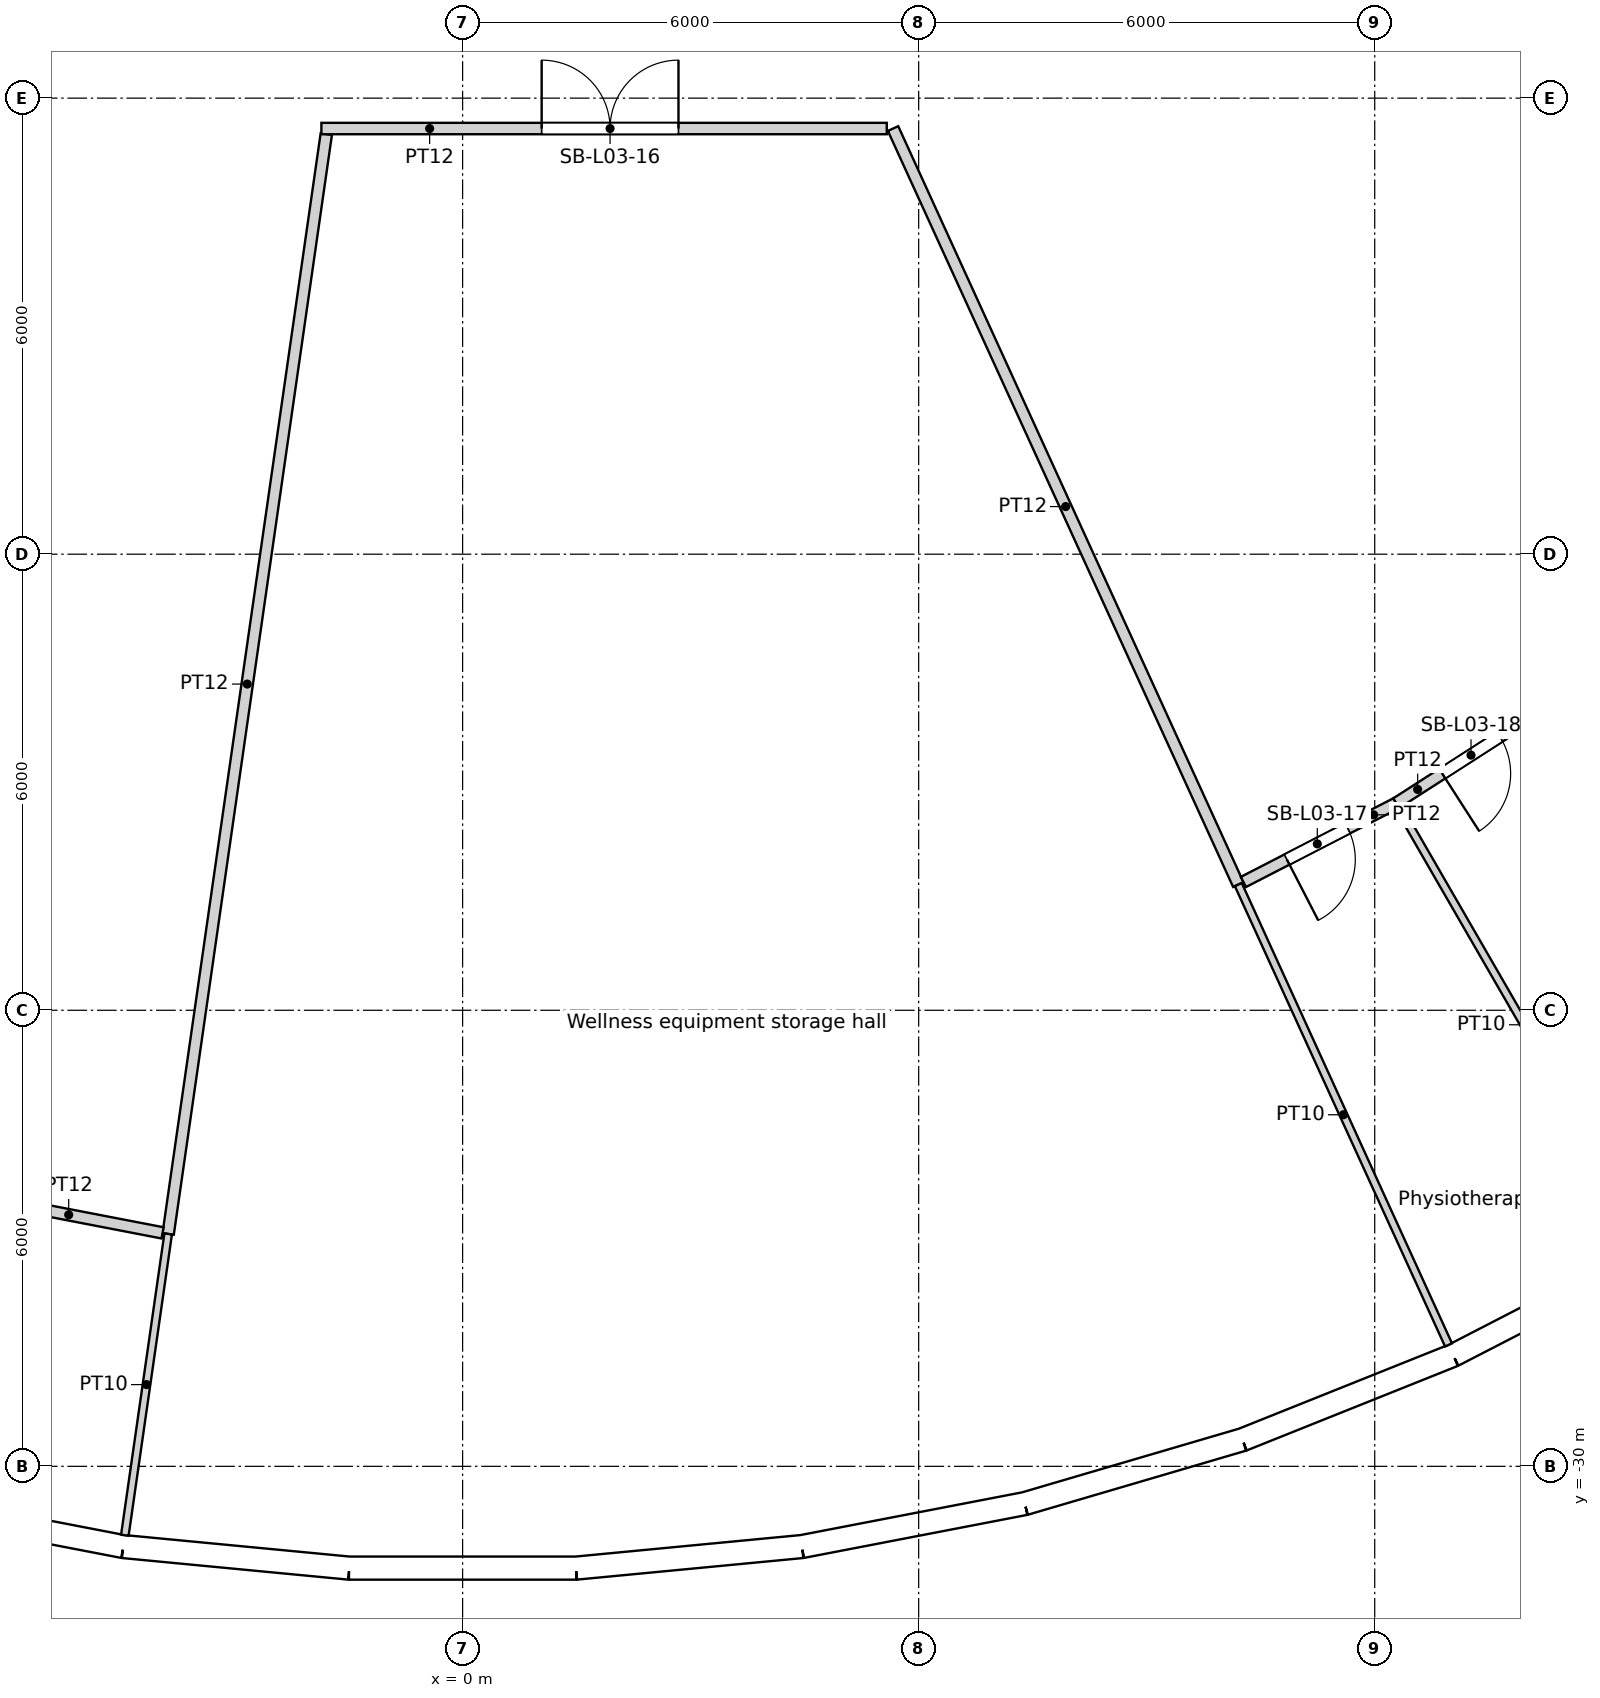
"""IFC4 building model, lengths in metres.
Left out: names, types, materials, properties, quantities, classifications, styles, units other than length and angle.
Written with IfcOpenShell. Run it as: python <this file> out.ifc"""

import sys

from ifc_helpers import new_model, si_unit, direction, frame, frame_2d, origin, origin_2d, place, context, subcontext, project, spatial, rectangle, circle, extrude, element, fill, save


model = new_model("IFC4")
c1 = context("Model", 3, precision=1e-05, world=origin(), true_north=direction((0.0, 1.0)))
c2 = subcontext(c1, "Body", "Model", "MODEL_VIEW")
j1 = project(units=[si_unit("LENGTHUNIT", "METRE"), si_unit("PLANEANGLEUNIT", "RADIAN")], contexts=[c1])
p1 = place(None, origin())
s1 = spatial("IfcSite", under=j1, at=p1, CompositionType="ELEMENT")
p2 = place(p1, origin())
s2 = spatial("IfcBuilding", under=s1, at=p2, CompositionType="ELEMENT")
p3 = place(p2, frame((0.0, 0.0, 18.6)))
s3 = spatial("IfcBuildingStorey", under=s2, at=p3, CompositionType="ELEMENT", Elevation=18.6)
for number, where, z_axis, x_axis in (
    (1, (-4.309, -29.966, 0.0), (0.0, 0.0, 1.0), (1.0, 0.0, 0.0)),
    (2, (1.44, -30.24, 0.0), (0.0, 0.0, 1.0), (1.0, 0.0, 0.0)),
    (3, (7.137, -29.421, 0.0), (0.0, 0.0, 1.0), (1.0, 0.0, 0.0)),
    (4, (12.576, -27.539, 0.0), (0.0, 0.0, 1.0), (1.0, 0.0, 0.0)),
):
    element("IfcColumn", number, at=place(p3, frame(where, z_axis=z_axis, x_axis=x_axis)), inside=s3, PredefinedType="COLUMN", context=c2, shape_type="SweptSolid", body=[
        extrude(circle(Radius=0.7, at=origin_2d()), origin(), (0.0, 0.0, 1.0), 4.8),
    ])
for number, where, z_axis, x_axis in (
    (5, (-1.427, -24.506, 0.0), (0.0, 0.0, 1.0), (1.0, 0.0, 0.0)),
    (6, (4.263, -24.175, 0.0), (0.0, 0.0, 1.0), (1.0, 0.0, 0.0)),
    (7, (9.723, -22.54, 0.0), (0.0, 0.0, 1.0), (1.0, 0.0, 0.0)),
    (8, (14.659, -19.69, 0.0), (0.0, 0.0, 1.0), (1.0, 0.0, 0.0)),
):
    element("IfcColumn", number, at=place(p3, frame(where, z_axis=z_axis, x_axis=x_axis)), inside=s3, PredefinedType="COLUMN", context=c2, shape_type="SweptSolid", body=[
        extrude(circle(Radius=0.75, at=origin_2d()), origin(), (0.0, 0.0, 1.0), 4.8),
    ])
for number, where, z_axis, x_axis in (
    (9, (-4.188, -18.35, 0.0), (0.0, 0.0, 1.0), (1.0, 0.0, 0.0)),
    (10, (1.406, -18.77, 0.0), (0.0, 0.0, 1.0), (1.0, 0.0, 0.0)),
    (11, (6.876, -17.521, 0.0), (0.0, 0.0, 1.0), (1.0, 0.0, 0.0)),
    (12, (11.735, -14.716, 0.0), (0.0, 0.0, 1.0), (1.0, 0.0, 0.0)),
):
    element("IfcColumn", number, at=place(p3, frame(where, z_axis=z_axis, x_axis=x_axis)), inside=s3, PredefinedType="COLUMN", context=c2, shape_type="SweptSolid", body=[
        extrude(circle(Radius=0.8, at=origin_2d()), origin(), (0.0, 0.0, 1.0), 4.8),
    ])
p4 = place(p3, frame((-7.397, -30.49, 0.0), z_axis=(0.0, 0.0, 1.0), x_axis=(0.981918853666, -0.189302310646, 0.0)))
e13 = element("IfcWall", 13, at=p4, inside=s3, PredefinedType="SOLIDWALL", context=c2, shape_type="SweptSolid", body=[
    extrude(rectangle(XDim=2.986, YDim=0.3, at=frame_2d((1.493, 0.0))), origin(), (0.0, 0.0, 1.0), 4.35),
])
p5 = place(p4, frame((1.493, 0.0, 2.0)))
e14 = element("IfcOpeningElement", 14, at=p5, cuts=e13, PredefinedType="OPENING", context=c2, shape_type="SweptSolid", body=[
    extrude(circle(Radius=1.2, at=origin_2d()), frame((0.0, 0.16, 0.0), z_axis=(0.0, -1.0, 0.0), x_axis=(1.0, 0.0, 0.0)), (0.0, 0.0, 1.0), 0.32),
])
p6 = place(p3, frame((-4.465, -31.055, 0.0), z_axis=(0.0, 0.0, 1.0), x_axis=(0.99547560533, -0.095017467833, 0.0)))
e15 = element("IfcWall", 15, at=p6, inside=s3, PredefinedType="SOLIDWALL", context=c2, shape_type="SweptSolid", body=[
    extrude(rectangle(XDim=2.986, YDim=0.3, at=frame_2d((1.493, 0.0))), origin(), (0.0, 0.0, 1.0), 4.35),
])
p7 = place(p6, frame((1.493, 0.0, 2.0)))
e16 = element("IfcOpeningElement", 16, at=p7, cuts=e15, PredefinedType="OPENING", context=c2, shape_type="SweptSolid", body=[
    extrude(circle(Radius=1.2, at=origin_2d()), frame((0.0, 0.16, 0.0), z_axis=(0.0, -1.0, 0.0), x_axis=(1.0, 0.0, 0.0)), (0.0, 0.0, 1.0), 0.32),
])
p8 = place(p3, frame((-1.493, -31.339, 0.0), z_axis=(0.0, 0.0, 1.0), x_axis=(1.0, 0.0, 0.0)))
e17 = element("IfcWall", 17, at=p8, inside=s3, PredefinedType="SOLIDWALL", context=c2, shape_type="SweptSolid", body=[
    extrude(rectangle(XDim=2.986, YDim=0.3, at=frame_2d((1.493, 0.0))), origin(), (0.0, 0.0, 1.0), 4.35),
])
p9 = place(p8, frame((1.493, 0.0, 2.0)))
e18 = element("IfcOpeningElement", 18, at=p9, cuts=e17, PredefinedType="OPENING", context=c2, shape_type="SweptSolid", body=[
    extrude(circle(Radius=1.2, at=origin_2d()), frame((0.0, 0.16, 0.0), z_axis=(0.0, -1.0, 0.0), x_axis=(1.0, 0.0, 0.0)), (0.0, 0.0, 1.0), 0.32),
])
p10 = place(p3, frame((1.493, -31.339, 0.0), z_axis=(0.0, 0.0, 1.0), x_axis=(0.99547560533, 0.095017467833, 0.0)))
e19 = element("IfcWall", 19, at=p10, inside=s3, PredefinedType="SOLIDWALL", context=c2, shape_type="SweptSolid", body=[
    extrude(rectangle(XDim=2.986, YDim=0.3, at=frame_2d((1.493, 0.0))), origin(), (0.0, 0.0, 1.0), 4.35),
])
p11 = place(p10, frame((1.493, 0.0, 2.0)))
e20 = element("IfcOpeningElement", 20, at=p11, cuts=e19, PredefinedType="OPENING", context=c2, shape_type="SweptSolid", body=[
    extrude(circle(Radius=1.2, at=origin_2d()), frame((0.0, 0.16, 0.0), z_axis=(0.0, -1.0, 0.0), x_axis=(1.0, 0.0, 0.0)), (0.0, 0.0, 1.0), 0.32),
])
p12 = place(p3, frame((4.465, -31.055, 0.0), z_axis=(0.0, 0.0, 1.0), x_axis=(0.981918853666, 0.189302310646, 0.0)))
e21 = element("IfcWall", 21, at=p12, inside=s3, PredefinedType="SOLIDWALL", context=c2, shape_type="SweptSolid", body=[
    extrude(rectangle(XDim=2.986, YDim=0.3, at=frame_2d((1.493, 0.0))), origin(), (0.0, 0.0, 1.0), 4.35),
])
p13 = place(p12, frame((1.493, 0.0, 2.0)))
e22 = element("IfcOpeningElement", 22, at=p13, cuts=e21, PredefinedType="OPENING", context=c2, shape_type="SweptSolid", body=[
    extrude(circle(Radius=1.2, at=origin_2d()), frame((0.0, 0.16, 0.0), z_axis=(0.0, -1.0, 0.0), x_axis=(1.0, 0.0, 0.0)), (0.0, 0.0, 1.0), 0.32),
])
p14 = place(p3, frame((7.397, -30.49, 0.0), z_axis=(0.0, 0.0, 1.0), x_axis=(0.959502108153, 0.281701445593, 0.0)))
e23 = element("IfcWall", 23, at=p14, inside=s3, PredefinedType="SOLIDWALL", context=c2, shape_type="SweptSolid", body=[
    extrude(rectangle(XDim=2.986, YDim=0.3, at=frame_2d((1.493, 0.0))), origin(), (0.0, 0.0, 1.0), 4.35),
])
p15 = place(p14, frame((1.493, 0.0, 2.0)))
e24 = element("IfcOpeningElement", 24, at=p15, cuts=e23, PredefinedType="OPENING", context=c2, shape_type="SweptSolid", body=[
    extrude(circle(Radius=1.2, at=origin_2d()), frame((0.0, 0.16, 0.0), z_axis=(0.0, -1.0, 0.0), x_axis=(1.0, 0.0, 0.0)), (0.0, 0.0, 1.0), 0.32),
])
p16 = place(p3, frame((10.261, -29.649, 0.0), z_axis=(0.0, 0.0, 1.0), x_axis=(0.928380795373, 0.371630325434, 0.0)))
e25 = element("IfcWall", 25, at=p16, inside=s3, PredefinedType="SOLIDWALL", context=c2, shape_type="SweptSolid", body=[
    extrude(rectangle(XDim=2.986, YDim=0.3, at=frame_2d((1.493, 0.0))), origin(), (0.0, 0.0, 1.0), 4.35),
])
p17 = place(p16, frame((1.493, 0.0, 2.0)))
e26 = element("IfcOpeningElement", 26, at=p17, cuts=e25, PredefinedType="OPENING", context=c2, shape_type="SweptSolid", body=[
    extrude(circle(Radius=1.2, at=origin_2d()), frame((0.0, 0.16, 0.0), z_axis=(0.0, -1.0, 0.0), x_axis=(1.0, 0.0, 0.0)), (0.0, 0.0, 1.0), 0.32),
])
p18 = place(p3, frame((13.033, -28.539, 0.0), z_axis=(0.0, 0.0, 1.0), x_axis=(0.888831268481, 0.458234630043, 0.0)))
e27 = element("IfcWall", 27, at=p18, inside=s3, PredefinedType="SOLIDWALL", context=c2, shape_type="SweptSolid", body=[
    extrude(rectangle(XDim=2.986, YDim=0.3, at=frame_2d((1.493, 0.0))), origin(), (0.0, 0.0, 1.0), 4.35),
])
p19 = place(p18, frame((1.493, 0.0, 2.0)))
e28 = element("IfcOpeningElement", 28, at=p19, cuts=e27, PredefinedType="OPENING", context=c2, shape_type="SweptSolid", body=[
    extrude(circle(Radius=1.2, at=origin_2d()), frame((0.0, 0.16, 0.0), z_axis=(0.0, -1.0, 0.0), x_axis=(1.0, 0.0, 0.0)), (0.0, 0.0, 1.0), 0.32),
])
p20 = place(p3, frame((-6.417, -26.452, 0.0), z_axis=(0.0, 0.0, 1.0), x_axis=(0.981923270902, -0.189279396823, 0.0)))
e29 = element("IfcWall", 29, at=p20, inside=s3, PredefinedType="PARTITIONING", context=c2, shape_type="SweptSolid", body=[
    extrude(rectangle(XDim=2.515, YDim=0.15, at=frame_2d((1.258, 0.0))), origin(), (0.0, 0.0, 1.0), 3.75),
])
p21 = place(p3, frame((-4.444, -30.906, 0.0), z_axis=(0.0, 0.0, 1.0), x_axis=(0.142291879115, 0.989824742638, 0.0)))
e30 = element("IfcWall", 30, at=p21, inside=s3, PredefinedType="PARTITIONING", context=c2, shape_type="SweptSolid", body=[
    extrude(rectangle(XDim=4.005, YDim=0.1, at=frame_2d((2.002, 0.0))), origin(), (0.0, 0.0, 1.0), 3.75),
])
p22 = place(p3, frame((-3.874, -26.943, 0.0), z_axis=(0.0, 0.0, 1.0), x_axis=(0.142302842894, 0.989823166482, 0.0)))
e31 = element("IfcWall", 31, at=p22, inside=s3, PredefinedType="PARTITIONING", context=c2, shape_type="SweptSolid", body=[
    extrude(rectangle(XDim=14.617, YDim=0.15, at=frame_2d((7.309, 0.0))), origin(), (0.0, 0.0, 1.0), 3.75),
])
p23 = place(p3, frame((5.58, -12.4, 0.0), z_axis=(0.0, 0.0, 1.0), x_axis=(-1.0, 0.0, 0.0)))
e32 = element("IfcWall", 32, at=p23, inside=s3, PredefinedType="PARTITIONING", context=c2, shape_type="SweptSolid", body=[
    extrude(rectangle(XDim=7.438, YDim=0.15, at=frame_2d((3.719, 0.0))), origin(), (0.0, 0.0, 1.0), 3.75),
])
p24 = place(p23, frame((2.74, 0.0, 0.0)))
e33 = element("IfcOpeningElement", 33, at=p24, cuts=e32, PredefinedType="OPENING", context=c2, shape_type="SweptSolid", body=[
    extrude(rectangle(XDim=1.8, YDim=2.4, at=frame_2d((0.9, 1.2))), frame((0.0, 0.075, 0.0), z_axis=(0.0, -1.0, 0.0), x_axis=(1.0, 0.0, 0.0)), (0.0, 0.0, 1.0), 0.15),
])
p25 = place(p3, frame((10.205, -22.347, 0.0), z_axis=(0.0, 0.0, 1.0), x_axis=(-0.415410432201, 0.909634087322, 0.0)))
e34 = element("IfcWall", 34, at=p25, inside=s3, PredefinedType="PARTITIONING", context=c2, shape_type="SweptSolid", body=[
    extrude(rectangle(XDim=10.935, YDim=0.15, at=frame_2d((5.467, 0.0))), origin(), (0.0, 0.0, 1.0), 3.75),
])
p26 = place(p3, frame((12.283, -21.275, 0.0), z_axis=(0.0, 0.0, 1.0), x_axis=(-0.888834753306, -0.458227870514, 0.0)))
e35 = element("IfcWall", 35, at=p26, inside=s3, PredefinedType="PARTITIONING", context=c2, shape_type="SweptSolid", body=[
    extrude(rectangle(XDim=2.263, YDim=0.15, at=frame_2d((1.131, 0.0))), origin(), (0.0, 0.0, 1.0), 3.75),
])
p27 = place(p26, frame((0.719, 0.0, 0.0)))
e36 = element("IfcOpeningElement", 36, at=p27, cuts=e35, PredefinedType="OPENING", context=c2, shape_type="SweptSolid", body=[
    extrude(rectangle(XDim=0.9, YDim=2.1, at=frame_2d((0.45, 1.05))), frame((0.0, 0.075, 0.0), z_axis=(0.0, -1.0, 0.0), x_axis=(1.0, 0.0, 0.0)), (0.0, 0.0, 1.0), 0.15),
])
p28 = place(p3, frame((14.25, -20.011, 0.0), z_axis=(0.0, 0.0, 1.0), x_axis=(-0.841236155743, -0.540667855777, 0.0)))
e37 = element("IfcWall", 37, at=p28, inside=s3, PredefinedType="PARTITIONING", context=c2, shape_type="SweptSolid", body=[
    extrude(rectangle(XDim=2.338, YDim=0.15, at=frame_2d((1.169, 0.0))), origin(), (0.0, 0.0, 1.0), 3.75),
])
p29 = place(p28, frame((0.719, 0.0, 0.0)))
e38 = element("IfcOpeningElement", 38, at=p29, cuts=e37, PredefinedType="OPENING", context=c2, shape_type="SweptSolid", body=[
    extrude(rectangle(XDim=0.9, YDim=2.1, at=frame_2d((0.45, 1.05))), frame((0.0, 0.075, 0.0), z_axis=(0.0, -1.0, 0.0), x_axis=(1.0, 0.0, 0.0)), (0.0, 0.0, 1.0), 0.15),
])
p30 = place(p3, frame((12.971, -28.403, 0.0), z_axis=(0.0, 0.0, 1.0), x_axis=(-0.415413073128, 0.909632881263, 0.0)))
e39 = element("IfcWall", 39, at=p30, inside=s3, PredefinedType="PARTITIONING", context=c2, shape_type="SweptSolid", body=[
    extrude(rectangle(XDim=6.657, YDim=0.1, at=frame_2d((3.329, 0.0))), origin(), (0.0, 0.0, 1.0), 3.75),
])
p31 = place(p3, frame((15.612, -27.041, 0.0), z_axis=(0.0, 0.0, 1.0), x_axis=(-0.499996417602, 0.866027472073, 0.0)))
e40 = element("IfcWall", 40, at=p31, inside=s3, PredefinedType="PARTITIONING", context=c2, shape_type="SweptSolid", body=[
    extrude(rectangle(XDim=6.583, YDim=0.1, at=frame_2d((3.291, 0.0))), origin(), (0.0, 0.0, 1.0), 3.75),
])
p32 = place(p5, origin())
e41 = element("IfcWindow", 41, at=p32, inside=s3, PartitioningType="SINGLE_PANEL", PredefinedType="WINDOW", context=c2, shape_type="SweptSolid", body=[
    extrude(circle(Radius=1.2, at=origin_2d()), frame((0.0, 0.12, 0.0), z_axis=(0.0, -1.0, 0.0), x_axis=(1.0, 0.0, 0.0)), (0.0, 0.0, 1.0), 0.1),
])
fill(e14, e41)
p33 = place(p7, origin())
e42 = element("IfcWindow", 42, at=p33, inside=s3, PartitioningType="SINGLE_PANEL", PredefinedType="WINDOW", context=c2, shape_type="SweptSolid", body=[
    extrude(circle(Radius=1.2, at=origin_2d()), frame((0.0, 0.12, 0.0), z_axis=(0.0, -1.0, 0.0), x_axis=(1.0, 0.0, 0.0)), (0.0, 0.0, 1.0), 0.1),
])
fill(e16, e42)
p34 = place(p9, origin())
e43 = element("IfcWindow", 43, at=p34, inside=s3, PartitioningType="SINGLE_PANEL", PredefinedType="WINDOW", context=c2, shape_type="SweptSolid", body=[
    extrude(circle(Radius=1.2, at=origin_2d()), frame((0.0, 0.12, 0.0), z_axis=(0.0, -1.0, 0.0), x_axis=(1.0, 0.0, 0.0)), (0.0, 0.0, 1.0), 0.1),
])
fill(e18, e43)
p35 = place(p11, origin())
e44 = element("IfcWindow", 44, at=p35, inside=s3, PartitioningType="SINGLE_PANEL", PredefinedType="WINDOW", context=c2, shape_type="SweptSolid", body=[
    extrude(circle(Radius=1.2, at=origin_2d()), frame((0.0, 0.12, 0.0), z_axis=(0.0, -1.0, 0.0), x_axis=(1.0, 0.0, 0.0)), (0.0, 0.0, 1.0), 0.1),
])
fill(e20, e44)
p36 = place(p13, origin())
e45 = element("IfcWindow", 45, at=p36, inside=s3, PartitioningType="SINGLE_PANEL", PredefinedType="WINDOW", context=c2, shape_type="SweptSolid", body=[
    extrude(circle(Radius=1.2, at=origin_2d()), frame((0.0, 0.12, 0.0), z_axis=(0.0, -1.0, 0.0), x_axis=(1.0, 0.0, 0.0)), (0.0, 0.0, 1.0), 0.1),
])
fill(e22, e45)
p37 = place(p15, origin())
e46 = element("IfcWindow", 46, at=p37, inside=s3, PartitioningType="SINGLE_PANEL", PredefinedType="WINDOW", context=c2, shape_type="SweptSolid", body=[
    extrude(circle(Radius=1.2, at=origin_2d()), frame((0.0, 0.12, 0.0), z_axis=(0.0, -1.0, 0.0), x_axis=(1.0, 0.0, 0.0)), (0.0, 0.0, 1.0), 0.1),
])
fill(e24, e46)
p38 = place(p17, origin())
e47 = element("IfcWindow", 47, at=p38, inside=s3, PartitioningType="SINGLE_PANEL", PredefinedType="WINDOW", context=c2, shape_type="SweptSolid", body=[
    extrude(circle(Radius=1.2, at=origin_2d()), frame((0.0, 0.12, 0.0), z_axis=(0.0, -1.0, 0.0), x_axis=(1.0, 0.0, 0.0)), (0.0, 0.0, 1.0), 0.1),
])
fill(e26, e47)
p39 = place(p19, origin())
e48 = element("IfcWindow", 48, at=p39, inside=s3, PartitioningType="SINGLE_PANEL", PredefinedType="WINDOW", context=c2, shape_type="SweptSolid", body=[
    extrude(circle(Radius=1.2, at=origin_2d()), frame((0.0, 0.12, 0.0), z_axis=(0.0, -1.0, 0.0), x_axis=(1.0, 0.0, 0.0)), (0.0, 0.0, 1.0), 0.1),
])
fill(e28, e48)
p40 = place(p24, origin())
e49 = element("IfcDoor", 49, at=p40, inside=s3, OperationType="DOUBLE_DOOR_SINGLE_SWING", PredefinedType="DOOR", context=c2, shape_type="SweptSolid", body=[
    extrude(rectangle(XDim=1.8, YDim=2.4, at=frame_2d((0.9, 1.2))), frame((0.0, 0.025, 0.0), z_axis=(0.0, -1.0, 0.0), x_axis=(1.0, 0.0, 0.0)), (0.0, 0.0, 1.0), 0.05),
])
fill(e33, e49)
p41 = place(p27, origin())
e50 = element("IfcDoor", 50, at=p41, inside=s3, OperationType="SINGLE_SWING_RIGHT", PredefinedType="DOOR", context=c2, shape_type="SweptSolid", body=[
    extrude(rectangle(XDim=0.9, YDim=2.1, at=frame_2d((0.45, 1.05))), frame((0.0, 0.025, 0.0), z_axis=(0.0, -1.0, 0.0), x_axis=(1.0, 0.0, 0.0)), (0.0, 0.0, 1.0), 0.05),
])
fill(e36, e50)
p42 = place(p29, origin())
e51 = element("IfcDoor", 51, at=p42, inside=s3, OperationType="SINGLE_SWING_RIGHT", PredefinedType="DOOR", context=c2, shape_type="SweptSolid", body=[
    extrude(rectangle(XDim=0.9, YDim=2.1, at=frame_2d((0.45, 1.05))), frame((0.0, 0.025, 0.0), z_axis=(0.0, -1.0, 0.0), x_axis=(1.0, 0.0, 0.0)), (0.0, 0.0, 1.0), 0.05),
])
fill(e38, e51)
save(model, sys.argv[1])
